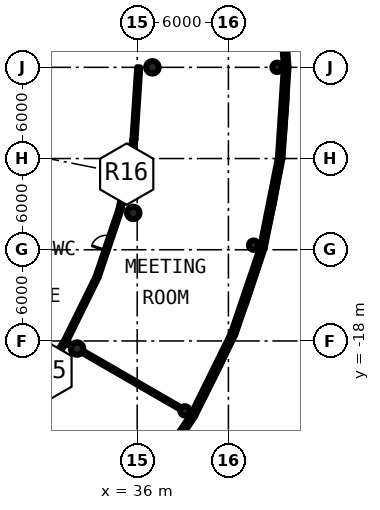
"""IFC4 building model, lengths in metres.
Left out: names, types, materials, properties, quantities, classifications, styles, units other than length and angle.
Written with IfcOpenShell. Run it as: python <this file> out.ifc"""

import sys

from ifc_helpers import new_model, si_unit, direction, frame, frame_2d, origin, origin_2d, place, context, subcontext, project, spatial, rectangle, hollow_circle, extrude, element, fill, save


model = new_model("IFC4")
c1 = context("Model", 3, precision=1e-05, world=origin(), true_north=direction((0.0, 1.0)))
c2 = subcontext(c1, "Body", "Model", "MODEL_VIEW")
j1 = project(units=[si_unit("LENGTHUNIT", "METRE"), si_unit("PLANEANGLEUNIT", "RADIAN")], contexts=[c1])
p1 = place(None, origin())
s1 = spatial("IfcSite", under=j1, at=p1, CompositionType="ELEMENT")
p2 = place(p1, origin())
s2 = spatial("IfcBuilding", under=s1, at=p2, CompositionType="ELEMENT")
p3 = place(p2, frame((0.0, 0.0, 5.4)))
s3 = spatial("IfcBuildingStorey", under=s2, at=p3, CompositionType="ELEMENT", Elevation=5.4)
for number, where, z_axis, x_axis in (
    (1, (37.0, 0.0, 0.0), (0.0, 0.0, 1.0), (1.0, 0.0, 0.0)),
    (2, (32.043, -18.5, 0.0), (0.0, 0.0, 1.0), (1.0, 0.0, 0.0)),
    (3, (35.739, -9.576, 0.0), (0.0, 0.0, 1.0), (1.0, 0.0, 0.0)),
):
    element("IfcColumn", number, at=place(p3, frame(where, z_axis=z_axis, x_axis=x_axis)), inside=s3, PredefinedType="COLUMN", context=c2, shape_type="SweptSolid", body=[
        extrude(hollow_circle(Radius=0.406, WallThickness=0.03, at=origin_2d()), origin(), (0.0, 0.0, 1.0), 4.2),
    ])
for number, where, z_axis, x_axis in (
    (4, (45.2, 0.0, 0.0), (0.0, 0.0, 1.0), (1.0, 0.0, 0.0)),
    (5, (39.144, -22.6, 0.0), (0.0, 0.0, 1.0), (1.0, 0.0, 0.0)),
    (6, (43.66, -11.698, 0.0), (0.0, 0.0, 1.0), (1.0, 0.0, 0.0)),
):
    element("IfcColumn", number, at=place(p3, frame(where, z_axis=z_axis, x_axis=x_axis)), inside=s3, PredefinedType="COLUMN", context=c2, shape_type="SweptSolid", body=[
        extrude(hollow_circle(Radius=0.305, WallThickness=0.025, at=origin_2d()), origin(), (0.0, 0.0, 1.0), 4.2),
    ])
p4 = place(p3, frame((45.8, 0.0, 0.0), z_axis=(0.0, 0.0, 1.0), x_axis=(-0.065447877106, 0.9978559893, 0.0)))
e7 = element("IfcWall", 7, at=p4, inside=s3, PredefinedType="SOLIDWALL", context=c2, shape_type="SweptSolid", body=[
    extrude(rectangle(XDim=5.991, YDim=0.3, at=frame_2d((2.996, 0.0))), origin(), (0.0, 0.0, 1.0), 3.7),
])
p5 = place(p4, frame((1.495, 0.0, 1.0)))
e8 = element("IfcOpeningElement", 8, at=p5, cuts=e7, PredefinedType="OPENING", context=c2, shape_type="SweptSolid", body=[
    extrude(rectangle(XDim=3.0, YDim=2.0, at=frame_2d((1.5, 1.0))), frame((0.0, 0.16, 0.0), z_axis=(0.0, -1.0, 0.0), x_axis=(1.0, 0.0, 0.0)), (0.0, 0.0, 1.0), 0.32),
])
p6 = place(p3, frame((36.336, -27.881, 0.0), z_axis=(0.0, 0.0, 1.0), x_axis=(0.55554631985, 0.831485590074, 0.0)))
e9 = element("IfcWall", 9, at=p6, inside=s3, PredefinedType="SOLIDWALL", context=c2, shape_type="SweptSolid", body=[
    extrude(rectangle(XDim=5.991, YDim=0.3, at=frame_2d((2.995, 0.0))), origin(), (0.0, 0.0, 1.0), 3.7),
])
p7 = place(p6, frame((1.495, 0.0, 1.0)))
e10 = element("IfcOpeningElement", 10, at=p7, cuts=e9, PredefinedType="OPENING", context=c2, shape_type="SweptSolid", body=[
    extrude(rectangle(XDim=3.0, YDim=2.0, at=frame_2d((1.5, 1.0))), frame((0.0, 0.16, 0.0), z_axis=(0.0, -1.0, 0.0), x_axis=(1.0, 0.0, 0.0)), (0.0, 0.0, 1.0), 0.32),
])
p8 = place(p3, frame((39.664, -22.9, 0.0), z_axis=(0.0, 0.0, 1.0), x_axis=(0.44233289833, 0.896850939151, 0.0)))
e11 = element("IfcWall", 11, at=p8, inside=s3, PredefinedType="SOLIDWALL", context=c2, shape_type="SweptSolid", body=[
    extrude(rectangle(XDim=5.991, YDim=0.3, at=frame_2d((2.995, 0.0))), origin(), (0.0, 0.0, 1.0), 3.7),
])
p9 = place(p8, frame((1.495, 0.0, 1.0)))
e12 = element("IfcOpeningElement", 12, at=p9, cuts=e11, PredefinedType="OPENING", context=c2, shape_type="SweptSolid", body=[
    extrude(rectangle(XDim=3.0, YDim=2.0, at=frame_2d((1.5, 1.0))), frame((0.0, 0.16, 0.0), z_axis=(0.0, -1.0, 0.0), x_axis=(1.0, 0.0, 0.0)), (0.0, 0.0, 1.0), 0.32),
])
p10 = place(p3, frame((42.314, -17.527, 0.0), z_axis=(0.0, 0.0, 1.0), x_axis=(0.321333542675, 0.946966078776, 0.0)))
e13 = element("IfcWall", 13, at=p10, inside=s3, PredefinedType="SOLIDWALL", context=c2, shape_type="SweptSolid", body=[
    extrude(rectangle(XDim=5.991, YDim=0.3, at=frame_2d((2.995, 0.0))), origin(), (0.0, 0.0, 1.0), 3.7),
])
p11 = place(p10, frame((1.495, 0.0, 1.0)))
e14 = element("IfcOpeningElement", 14, at=p11, cuts=e13, PredefinedType="OPENING", context=c2, shape_type="SweptSolid", body=[
    extrude(rectangle(XDim=3.0, YDim=2.0, at=frame_2d((1.5, 1.0))), frame((0.0, 0.16, 0.0), z_axis=(0.0, -1.0, 0.0), x_axis=(1.0, 0.0, 0.0)), (0.0, 0.0, 1.0), 0.32),
])
p12 = place(p3, frame((44.239, -11.854, 0.0), z_axis=(0.0, 0.0, 1.0), x_axis=(0.195112945602, 0.980780780021, 0.0)))
e15 = element("IfcWall", 15, at=p12, inside=s3, PredefinedType="SOLIDWALL", context=c2, shape_type="SweptSolid", body=[
    extrude(rectangle(XDim=5.991, YDim=0.3, at=frame_2d((2.996, 0.0))), origin(), (0.0, 0.0, 1.0), 3.7),
])
p13 = place(p12, frame((1.495, 0.0, 1.0)))
e16 = element("IfcOpeningElement", 16, at=p13, cuts=e15, PredefinedType="OPENING", context=c2, shape_type="SweptSolid", body=[
    extrude(rectangle(XDim=3.0, YDim=2.0, at=frame_2d((1.5, 1.0))), frame((0.0, 0.16, 0.0), z_axis=(0.0, -1.0, 0.0), x_axis=(1.0, 0.0, 0.0)), (0.0, 0.0, 1.0), 0.32),
])
p14 = place(p3, frame((45.408, -5.978, 0.0), z_axis=(0.0, 0.0, 1.0), x_axis=(0.065447877106, 0.9978559893, 0.0)))
e17 = element("IfcWall", 17, at=p14, inside=s3, PredefinedType="SOLIDWALL", context=c2, shape_type="SweptSolid", body=[
    extrude(rectangle(XDim=5.991, YDim=0.3, at=frame_2d((2.996, 0.0))), origin(), (0.0, 0.0, 1.0), 3.7),
])
p15 = place(p14, frame((1.495, 0.0, 1.0)))
e18 = element("IfcOpeningElement", 18, at=p15, cuts=e17, PredefinedType="OPENING", context=c2, shape_type="SweptSolid", body=[
    extrude(rectangle(XDim=3.0, YDim=2.0, at=frame_2d((1.5, 1.0))), frame((0.0, 0.16, 0.0), z_axis=(0.0, -1.0, 0.0), x_axis=(1.0, 0.0, 0.0)), (0.0, 0.0, 1.0), 0.32),
])
p16 = place(p3, frame((28.64, -21.976, 0.0), z_axis=(0.0, 0.0, 1.0), x_axis=(0.555678147384, 0.831397496099, 0.0)))
e19 = element("IfcWall", 19, at=p16, inside=s3, PredefinedType="PARTITIONING", context=c2, shape_type="SweptSolid", body=[
    extrude(rectangle(XDim=4.722, YDim=0.2, at=frame_2d((2.361, 0.0))), origin(), (0.0, 0.0, 1.0), 3.7),
])
p17 = place(p3, frame((31.264, -18.05, 0.0), z_axis=(0.0, 0.0, 1.0), x_axis=(0.442222407568, 0.896905425474, 0.0)))
e20 = element("IfcWall", 20, at=p17, inside=s3, PredefinedType="PARTITIONING", context=c2, shape_type="SweptSolid", body=[
    extrude(rectangle(XDim=4.722, YDim=0.2, at=frame_2d((2.361, 0.0))), origin(), (0.0, 0.0, 1.0), 3.7),
])
p18 = place(p3, frame((33.352, -13.815, 0.0), z_axis=(0.0, 0.0, 1.0), x_axis=(0.321449493775, 0.946926725229, 0.0)))
e21 = element("IfcWall", 21, at=p18, inside=s3, PredefinedType="PARTITIONING", context=c2, shape_type="SweptSolid", body=[
    extrude(rectangle(XDim=4.723, YDim=0.2, at=frame_2d((2.361, 0.0))), origin(), (0.0, 0.0, 1.0), 3.7),
])
p19 = place(p18, frame((1.861, 0.0, 0.0)))
e22 = element("IfcOpeningElement", 22, at=p19, cuts=e21, PredefinedType="OPENING", context=c2, shape_type="SweptSolid", body=[
    extrude(rectangle(XDim=1.0, YDim=2.3, at=frame_2d((0.5, 1.15))), frame((0.0, 0.11, 0.0), z_axis=(0.0, -1.0, 0.0), x_axis=(1.0, 0.0, 0.0)), (0.0, 0.0, 1.0), 0.22),
])
p20 = place(p3, frame((34.87, -9.343, 0.0), z_axis=(0.0, 0.0, 1.0), x_axis=(0.195032193809, 0.980796841032, 0.0)))
e23 = element("IfcWall", 23, at=p20, inside=s3, PredefinedType="PARTITIONING", context=c2, shape_type="SweptSolid", body=[
    extrude(rectangle(XDim=4.722, YDim=0.2, at=frame_2d((2.361, 0.0))), origin(), (0.0, 0.0, 1.0), 3.7),
])
p21 = place(p3, frame((35.791, -4.712, 0.0), z_axis=(0.0, 0.0, 1.0), x_axis=(0.065455185264, 0.997855509942, 0.0)))
e24 = element("IfcWall", 24, at=p21, inside=s3, PredefinedType="PARTITIONING", context=c2, shape_type="SweptSolid", body=[
    extrude(rectangle(XDim=4.722, YDim=0.2, at=frame_2d((2.361, 0.0))), origin(), (0.0, 0.0, 1.0), 3.7),
])
p22 = place(p3, frame((31.262, -18.054, 0.0), z_axis=(0.0, 0.0, 1.0), x_axis=(0.866071776036, -0.499919672301, 0.0)))
e25 = element("IfcWall", 25, at=p22, inside=s3, PredefinedType="PARTITIONING", context=c2, shape_type="SweptSolid", body=[
    extrude(rectangle(XDim=0.5, YDim=0.15, at=frame_2d((0.25, 0.0))), origin(), (0.0, 0.0, 1.0), 3.7),
])
p23 = place(p3, frame((32.387, -18.703, 0.0), z_axis=(0.0, 0.0, 1.0), x_axis=(0.865952477869, -0.500126290124, 0.0)))
e26 = element("IfcWall", 26, at=p23, inside=s3, PredefinedType="PARTITIONING", context=c2, shape_type="SweptSolid", body=[
    extrude(rectangle(XDim=7.5, YDim=0.15, at=frame_2d((3.75, 0.0))), origin(), (0.0, 0.0, 1.0), 3.7),
])
p24 = place(p9, origin())
e27 = element("IfcWindow", 27, at=p24, inside=s3, PartitioningType="SINGLE_PANEL", PredefinedType="WINDOW", context=c2, shape_type="SweptSolid", body=[
    extrude(rectangle(XDim=3.0, YDim=2.0, at=frame_2d((1.5, 1.0))), frame((0.0, 0.03, 0.0), z_axis=(0.0, -1.0, 0.0), x_axis=(1.0, 0.0, 0.0)), (0.0, 0.0, 1.0), 0.06),
])
fill(e12, e27)
p25 = place(p11, origin())
e28 = element("IfcWindow", 28, at=p25, inside=s3, PartitioningType="SINGLE_PANEL", PredefinedType="WINDOW", context=c2, shape_type="SweptSolid", body=[
    extrude(rectangle(XDim=3.0, YDim=2.0, at=frame_2d((1.5, 1.0))), frame((0.0, 0.03, 0.0), z_axis=(0.0, -1.0, 0.0), x_axis=(1.0, 0.0, 0.0)), (0.0, 0.0, 1.0), 0.06),
])
fill(e14, e28)
p26 = place(p13, origin())
e29 = element("IfcWindow", 29, at=p26, inside=s3, PartitioningType="SINGLE_PANEL", PredefinedType="WINDOW", context=c2, shape_type="SweptSolid", body=[
    extrude(rectangle(XDim=3.0, YDim=2.0, at=frame_2d((1.5, 1.0))), frame((0.0, 0.03, 0.0), z_axis=(0.0, -1.0, 0.0), x_axis=(1.0, 0.0, 0.0)), (0.0, 0.0, 1.0), 0.06),
])
fill(e16, e29)
p27 = place(p15, origin())
e30 = element("IfcWindow", 30, at=p27, inside=s3, PartitioningType="SINGLE_PANEL", PredefinedType="WINDOW", context=c2, shape_type="SweptSolid", body=[
    extrude(rectangle(XDim=3.0, YDim=2.0, at=frame_2d((1.5, 1.0))), frame((0.0, 0.03, 0.0), z_axis=(0.0, -1.0, 0.0), x_axis=(1.0, 0.0, 0.0)), (0.0, 0.0, 1.0), 0.06),
])
fill(e18, e30)
p28 = place(p19, origin())
e31 = element("IfcDoor", 31, at=p28, inside=s3, OperationType="SINGLE_SWING_LEFT", PredefinedType="DOOR", context=c2, shape_type="SweptSolid", body=[
    extrude(rectangle(XDim=1.0, YDim=2.3, at=frame_2d((0.5, 1.15))), frame((0.0, 0.025, 0.0), z_axis=(0.0, -1.0, 0.0), x_axis=(1.0, 0.0, 0.0)), (0.0, 0.0, 1.0), 0.05),
])
fill(e22, e31)
save(model, sys.argv[1])
